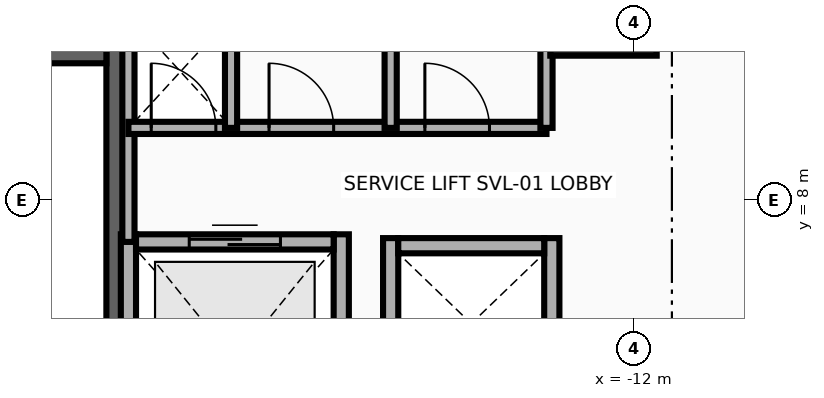
"""IFC4 building model, lengths in metres.
Left out: names, types, materials, properties, quantities, classifications, styles, units other than length and angle.
Written with IfcOpenShell. Run it as: python <this file> out.ifc"""

import sys

from ifc_helpers import new_model, si_unit, direction, frame, frame_2d, origin, origin_2d, place, context, subcontext, project, spatial, rectangle, extrude, source, transform, mapped, element, fill, save


model = new_model("IFC4")
c1 = context("Model", 3, precision=1e-05, world=origin(), true_north=direction((0.0, 1.0)))
c2 = subcontext(c1, "Body", "Model", "MODEL_VIEW")
j1 = project(units=[si_unit("LENGTHUNIT", "METRE"), si_unit("PLANEANGLEUNIT", "RADIAN")], contexts=[c1])
p1 = place(None, origin())
s1 = spatial("IfcSite", under=j1, at=p1, CompositionType="ELEMENT")
p2 = place(p1, origin())
s2 = spatial("IfcBuilding", under=s1, at=p2, CompositionType="ELEMENT")
p3 = place(p2, frame((0.0, 0.0, 40.8)))
s3 = spatial("IfcBuildingStorey", under=s2, at=p3, CompositionType="ELEMENT", Elevation=40.8)
p4 = place(p3, frame((-18.83, 1.78, 0.0), z_axis=(0.0, 0.0, 1.0), x_axis=(0.0, 1.0, 0.0)))
e1 = element("IfcWall", 1, at=p4, inside=s3, PredefinedType="SHEAR", context=c2, shape_type="SweptSolid", body=[
    extrude(rectangle(XDim=8.67, YDim=0.22, at=frame_2d((4.335, 0.0))), origin(), (0.0, 0.0, 1.0), 3.46),
])
p5 = place(p3, frame((-22.05, 9.91, 0.0), z_axis=(0.0, 0.0, 1.0), x_axis=(1.0, 0.0, 0.0)))
e2 = element("IfcWall", 2, at=p5, inside=s3, PredefinedType="SHEAR", context=c2, shape_type="SweptSolid", body=[
    extrude(rectangle(XDim=3.11, YDim=0.22, at=frame_2d((1.555, 0.0))), origin(), (0.0, 0.0, 1.0), 3.46),
])
m1 = source(origin(), c2, "Body", "SweptSolid", [
    extrude(rectangle(XDim=1.4, YDim=1.4, at=origin_2d()), origin(), (0.0, 0.0, 1.0), 3.7),
])
p6 = place(p3, frame((-12.4, 10.6, 0.0), z_axis=(0.0, 0.0, 1.0), x_axis=(1.0, 0.0, 0.0)))
e3 = element("IfcColumn", 3, at=p6, inside=s3, PredefinedType="COLUMN", context=c2, shape_type="MappedRepresentation", body=[
    mapped(m1, transform((0.0, 0.0, 0.0), x_axis=(1.0, 0.0, 0.0), y_axis=(0.0, 1.0, 0.0), z_axis=(0.0, 0.0, 1.0), scale=1.0)),
])
for number, where, z_axis, x_axis in (
    (4, (-18.65, 4.225, 0.0), (0.0, 0.0, 1.0), (0.0, 1.0, 0.0)),
    (5, (-15.85, 4.225, 0.0), (0.0, 0.0, 1.0), (0.0, 1.0, 0.0)),
):
    element("IfcWall", number, at=place(p3, frame(where, z_axis=z_axis, x_axis=x_axis)), inside=s3, PredefinedType="MOVABLE", context=c2, shape_type="SweptSolid", body=[
        extrude(rectangle(XDim=3.325, YDim=0.2, at=frame_2d((1.663, 0.0))), origin(), (0.0, 0.0, 1.0), 3.46),
    ])
p7 = place(p3, frame((-18.55, 7.45, 0.0), z_axis=(0.0, 0.0, 1.0), x_axis=(1.0, 0.0, 0.0)))
e6 = element("IfcWall", 6, at=p7, inside=s3, PredefinedType="MOVABLE", context=c2, shape_type="SweptSolid", body=[
    extrude(rectangle(XDim=2.6, YDim=0.2, at=frame_2d((1.3, 0.0))), origin(), (0.0, 0.0, 1.0), 3.46),
])
p8 = place(p7, frame((0.7, 0.0, 0.0)))
e7 = element("IfcOpeningElement", 7, at=p8, cuts=e6, PredefinedType="OPENING", context=c2, shape_type="SweptSolid", body=[
    extrude(rectangle(XDim=1.2, YDim=2.1, at=frame_2d((0.6, 1.05))), frame((0.0, 0.115, 0.0), z_axis=(0.0, -1.0, 0.0), x_axis=(1.0, 0.0, 0.0)), (0.0, 0.0, 1.0), 0.23),
])
for number, where, z_axis, x_axis in (
    (8, (-15.2, 5.25, 0.0), (0.0, 0.0, 1.0), (0.0, 1.0, 0.0)),
    (9, (-13.08, 5.25, 0.0), (0.0, 0.0, 1.0), (0.0, 1.0, 0.0)),
):
    element("IfcWall", number, at=place(p3, frame(where, z_axis=z_axis, x_axis=x_axis)), inside=s3, PredefinedType="MOVABLE", context=c2, shape_type="SweptSolid", body=[
        extrude(rectangle(XDim=2.25, YDim=0.2, at=frame_2d((1.125, 0.0))), origin(), (0.0, 0.0, 1.0), 3.46),
    ])
p9 = place(p3, frame((-15.1, 7.4, 0.0), z_axis=(0.0, 0.0, 1.0), x_axis=(1.0, 0.0, 0.0)))
e10 = element("IfcWall", 10, at=p9, inside=s3, PredefinedType="MOVABLE", context=c2, shape_type="SweptSolid", body=[
    extrude(rectangle(XDim=1.92, YDim=0.2, at=frame_2d((0.96, 0.0))), origin(), (0.0, 0.0, 1.0), 3.46),
])
p10 = place(p3, frame((-18.65, 7.45, 0.0), z_axis=(0.0, 0.0, 1.0), x_axis=(0.0, 1.0, 0.0)))
e11 = element("IfcWall", 11, at=p10, inside=s3, PredefinedType="PARTITIONING", context=c2, shape_type="SweptSolid", body=[
    extrude(rectangle(XDim=2.93, YDim=0.16, at=frame_2d((1.465, 0.0))), origin(), (0.0, 0.0, 1.0), 3.46),
])
p11 = place(p3, frame((-18.65, 8.95, 0.0), z_axis=(0.0, 0.0, 1.0), x_axis=(1.0, 0.0, 0.0)))
e12 = element("IfcWall", 12, at=p11, inside=s3, PredefinedType="PARTITIONING", context=c2, shape_type="SweptSolid", body=[
    extrude(rectangle(XDim=5.5, YDim=0.16, at=frame_2d((2.75, 0.0))), origin(), (0.0, 0.0, 1.0), 3.46),
])
p12 = place(p11, frame((0.3, 0.0, 0.0)))
e13 = element("IfcOpeningElement", 13, at=p12, cuts=e12, PredefinedType="OPENING", context=c2, shape_type="SweptSolid", body=[
    extrude(rectangle(XDim=0.85, YDim=2.05, at=frame_2d((0.425, 1.025))), frame((0.0, 0.095, 0.0), z_axis=(0.0, -1.0, 0.0), x_axis=(1.0, 0.0, 0.0)), (0.0, 0.0, 1.0), 0.19),
])
p13 = place(p11, frame((1.85, 0.0, 0.0)))
e14 = element("IfcOpeningElement", 14, at=p13, cuts=e12, PredefinedType="OPENING", context=c2, shape_type="SweptSolid", body=[
    extrude(rectangle(XDim=0.85, YDim=2.05, at=frame_2d((0.425, 1.025))), frame((0.0, 0.095, 0.0), z_axis=(0.0, -1.0, 0.0), x_axis=(1.0, 0.0, 0.0)), (0.0, 0.0, 1.0), 0.19),
])
p14 = place(p11, frame((3.9, 0.0, 0.0)))
e15 = element("IfcOpeningElement", 15, at=p14, cuts=e12, PredefinedType="OPENING", context=c2, shape_type="SweptSolid", body=[
    extrude(rectangle(XDim=0.85, YDim=2.05, at=frame_2d((0.425, 1.025))), frame((0.0, 0.095, 0.0), z_axis=(0.0, -1.0, 0.0), x_axis=(1.0, 0.0, 0.0)), (0.0, 0.0, 1.0), 0.19),
])
for number, where, z_axis, x_axis in (
    (16, (-13.15, 8.95, 0.0), (0.0, 0.0, 1.0), (0.0, 1.0, 0.0)),
    (17, (-17.3, 8.95, 0.0), (0.0, 0.0, 1.0), (0.0, 1.0, 0.0)),
    (18, (-15.2, 8.95, 0.0), (0.0, 0.0, 1.0), (0.0, 1.0, 0.0)),
):
    element("IfcWall", number, at=place(p3, frame(where, z_axis=z_axis, x_axis=x_axis)), inside=s3, PredefinedType="PARTITIONING", context=c2, shape_type="SweptSolid", body=[
        extrude(rectangle(XDim=1.43, YDim=0.16, at=frame_2d((0.715, 0.0))), origin(), (0.0, 0.0, 1.0), 3.46),
    ])
p15 = place(p8, origin())
e19 = element("IfcDoor", 19, at=p15, inside=s3, OperationType="DOUBLE_DOOR_SLIDING", PredefinedType="DOOR", context=c2, shape_type="SweptSolid", body=[
    extrude(rectangle(XDim=1.2, YDim=2.1, at=frame_2d((0.6, 1.05))), frame((0.0, 0.025, 0.0), z_axis=(0.0, -1.0, 0.0), x_axis=(1.0, 0.0, 0.0)), (0.0, 0.0, 1.0), 0.05),
])
fill(e7, e19)
p16 = place(p12, origin())
e20 = element("IfcDoor", 20, at=p16, inside=s3, OperationType="SINGLE_SWING_LEFT", PredefinedType="DOOR", context=c2, shape_type="SweptSolid", body=[
    extrude(rectangle(XDim=0.85, YDim=2.05, at=frame_2d((0.425, 1.025))), frame((0.0, 0.025, 0.0), z_axis=(0.0, -1.0, 0.0), x_axis=(1.0, 0.0, 0.0)), (0.0, 0.0, 1.0), 0.05),
])
fill(e13, e20)
p17 = place(p13, origin())
e21 = element("IfcDoor", 21, at=p17, inside=s3, OperationType="SINGLE_SWING_RIGHT", PredefinedType="DOOR", context=c2, shape_type="SweptSolid", body=[
    extrude(rectangle(XDim=0.85, YDim=2.05, at=frame_2d((0.425, 1.025))), frame((0.0, 0.025, 0.0), z_axis=(0.0, -1.0, 0.0), x_axis=(1.0, 0.0, 0.0)), (0.0, 0.0, 1.0), 0.05),
])
fill(e14, e21)
p18 = place(p14, origin())
e22 = element("IfcDoor", 22, at=p18, inside=s3, OperationType="SINGLE_SWING_LEFT", PredefinedType="DOOR", context=c2, shape_type="SweptSolid", body=[
    extrude(rectangle(XDim=0.85, YDim=2.05, at=frame_2d((0.425, 1.025))), frame((0.0, 0.025, 0.0), z_axis=(0.0, -1.0, 0.0), x_axis=(1.0, 0.0, 0.0)), (0.0, 0.0, 1.0), 0.05),
])
fill(e15, e22)
save(model, sys.argv[1])
